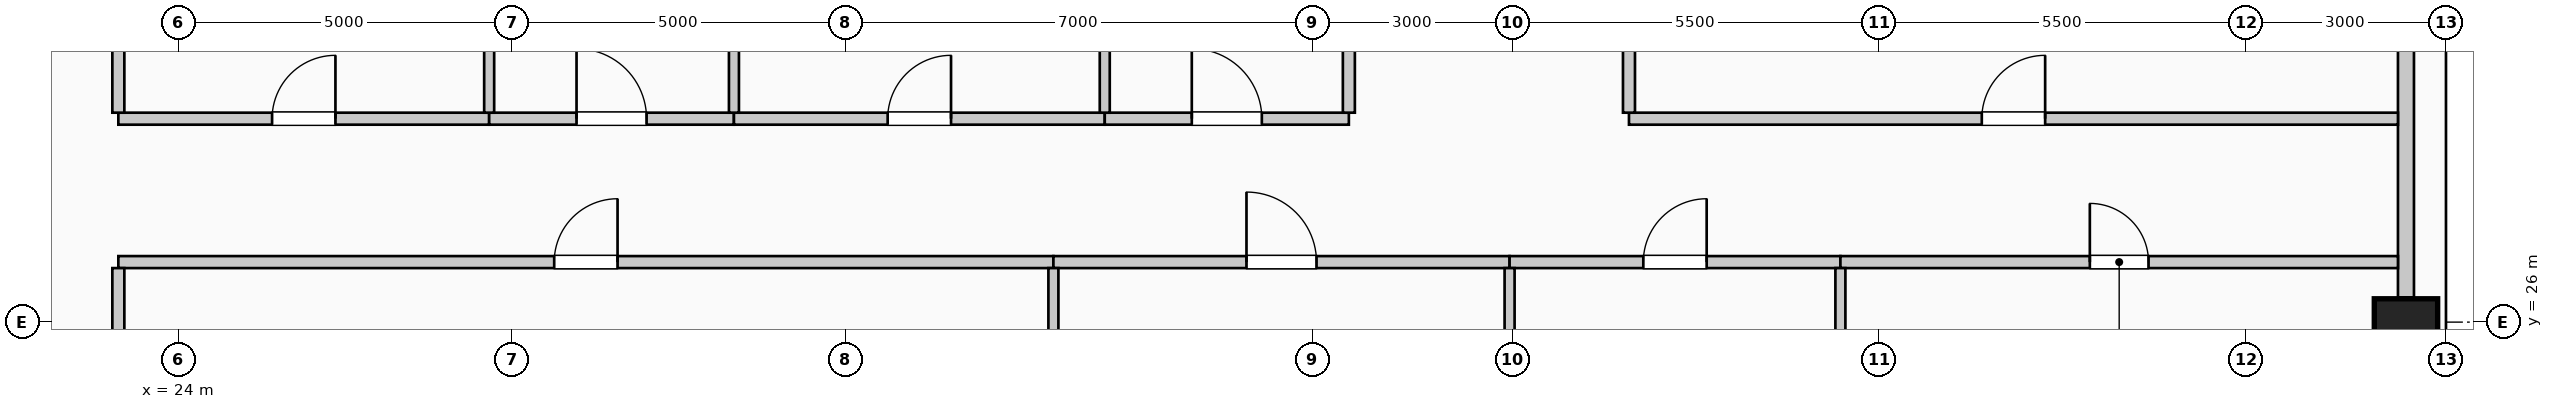
"""IFC4 building model, lengths in metres.
Left out: names, types, materials, properties, quantities, classifications, styles, units other than length and angle.
Written with IfcOpenShell. Run it as: python <this file> out.ifc"""

import sys

from ifc_helpers import new_model, si_unit, direction, frame, frame_2d, origin, origin_2d, place, context, subcontext, project, spatial, rectangle, extrude, element, fill, save


model = new_model("IFC4")
c1 = context("Model", 3, precision=1e-05, world=origin(), true_north=direction((0.0, 1.0)))
c2 = subcontext(c1, "Body", "Model", "MODEL_VIEW")
j1 = project(units=[si_unit("LENGTHUNIT", "METRE"), si_unit("PLANEANGLEUNIT", "RADIAN")], contexts=[c1])
p1 = place(None, origin())
s1 = spatial("IfcSite", under=j1, at=p1, CompositionType="ELEMENT")
p2 = place(p1, origin())
s2 = spatial("IfcBuilding", under=s1, at=p2, CompositionType="ELEMENT")
p3 = place(p2, frame((0.0, 0.0, 272.6)))
s3 = spatial("IfcBuildingStorey", under=s2, at=p3, CompositionType="ELEMENT", Elevation=272.6)
p4 = place(p3, frame((57.4, 26.0, 0.0), z_axis=(0.0, 0.0, 1.0), x_axis=(0.0, 1.0, 0.0)))
e1 = element("IfcColumn", 1, at=p4, inside=s3, PredefinedType="COLUMN", context=c2, shape_type="SweptSolid", body=[
    extrude(rectangle(XDim=0.7, YDim=0.95, at=origin_2d()), origin(), (0.0, 0.0, 1.0), 4.0),
])
p5 = place(p3, frame((57.4, 33.63, 0.0), z_axis=(0.0, 0.0, 1.0), x_axis=(0.0, -1.0, 0.0)))
e2 = element("IfcWall", 2, at=p5, inside=s3, PredefinedType="SOLIDWALL", context=c2, shape_type="SweptSolid", body=[
    extrude(rectangle(XDim=7.26, YDim=0.24, at=frame_2d((3.63, 0.0))), origin(), (0.0, 0.0, 1.0), 3.0),
])
p6 = place(p3, frame((23.1, 26.9, 0.0), z_axis=(0.0, 0.0, 1.0), x_axis=(1.0, 0.0, 0.0)))
e3 = element("IfcWall", 3, at=p6, inside=s3, PredefinedType="PARTITIONING", context=c2, shape_type="SweptSolid", body=[
    extrude(rectangle(XDim=14.02, YDim=0.18, at=frame_2d((7.01, 0.0))), origin(), (0.0, 0.0, 1.0), 3.75),
])
p7 = place(p6, frame((6.535, 0.0, 0.0)))
e4 = element("IfcOpeningElement", 4, at=p7, cuts=e3, PredefinedType="OPENING", context=c2, shape_type="SweptSolid", body=[
    extrude(rectangle(XDim=0.95, YDim=2.15, at=frame_2d((0.475, 1.075))), frame((0.0, 0.1, 0.0), z_axis=(0.0, -1.0, 0.0), x_axis=(1.0, 0.0, 0.0)), (0.0, 0.0, 1.0), 0.2),
])
p8 = place(p3, frame((37.12, 26.9, 0.0), z_axis=(0.0, 0.0, 1.0), x_axis=(1.0, 0.0, 0.0)))
e5 = element("IfcWall", 5, at=p8, inside=s3, PredefinedType="PARTITIONING", context=c2, shape_type="SweptSolid", body=[
    extrude(rectangle(XDim=6.84, YDim=0.18, at=frame_2d((3.42, 0.0))), origin(), (0.0, 0.0, 1.0), 3.75),
])
p9 = place(p8, frame((2.895, 0.0, 0.0)))
e6 = element("IfcOpeningElement", 6, at=p9, cuts=e5, PredefinedType="OPENING", context=c2, shape_type="SweptSolid", body=[
    extrude(rectangle(XDim=1.05, YDim=2.15, at=frame_2d((0.525, 1.075))), frame((0.0, 0.1, 0.0), z_axis=(0.0, -1.0, 0.0), x_axis=(1.0, 0.0, 0.0)), (0.0, 0.0, 1.0), 0.2),
])
p10 = place(p3, frame((43.96, 26.9, 0.0), z_axis=(0.0, 0.0, 1.0), x_axis=(1.0, 0.0, 0.0)))
e7 = element("IfcWall", 7, at=p10, inside=s3, PredefinedType="PARTITIONING", context=c2, shape_type="SweptSolid", body=[
    extrude(rectangle(XDim=4.96, YDim=0.18, at=frame_2d((2.48, 0.0))), origin(), (0.0, 0.0, 1.0), 3.75),
])
p11 = place(p10, frame((2.005, 0.0, 0.0)))
e8 = element("IfcOpeningElement", 8, at=p11, cuts=e7, PredefinedType="OPENING", context=c2, shape_type="SweptSolid", body=[
    extrude(rectangle(XDim=0.95, YDim=2.15, at=frame_2d((0.475, 1.075))), frame((0.0, 0.1, 0.0), z_axis=(0.0, -1.0, 0.0), x_axis=(1.0, 0.0, 0.0)), (0.0, 0.0, 1.0), 0.2),
])
p12 = place(p3, frame((48.92, 26.9, 0.0), z_axis=(0.0, 0.0, 1.0), x_axis=(1.0, 0.0, 0.0)))
e9 = element("IfcWall", 9, at=p12, inside=s3, PredefinedType="PARTITIONING", context=c2, shape_type="SweptSolid", body=[
    extrude(rectangle(XDim=8.36, YDim=0.18, at=frame_2d((4.18, 0.0))), origin(), (0.0, 0.0, 1.0), 3.75),
])
p13 = place(p12, frame((3.74, 0.0, 0.0)))
e10 = element("IfcOpeningElement", 10, at=p13, cuts=e9, PredefinedType="OPENING", context=c2, shape_type="SweptSolid", body=[
    extrude(rectangle(XDim=0.88, YDim=2.1, at=frame_2d((0.44, 1.05))), frame((0.0, 0.1, 0.0), z_axis=(0.0, -1.0, 0.0), x_axis=(1.0, 0.0, 0.0)), (0.0, 0.0, 1.0), 0.2),
])
p14 = place(p3, frame((23.1, 29.05, 0.0), z_axis=(0.0, 0.0, 1.0), x_axis=(1.0, 0.0, 0.0)))
e11 = element("IfcWall", 11, at=p14, inside=s3, PredefinedType="PARTITIONING", context=c2, shape_type="SweptSolid", body=[
    extrude(rectangle(XDim=5.56, YDim=0.18, at=frame_2d((2.78, 0.0))), origin(), (0.0, 0.0, 1.0), 3.75),
])
p15 = place(p14, frame((2.305, 0.0, 0.0)))
e12 = element("IfcOpeningElement", 12, at=p15, cuts=e11, PredefinedType="OPENING", context=c2, shape_type="SweptSolid", body=[
    extrude(rectangle(XDim=0.95, YDim=2.15, at=frame_2d((0.475, 1.075))), frame((0.0, 0.1, 0.0), z_axis=(0.0, -1.0, 0.0), x_axis=(1.0, 0.0, 0.0)), (0.0, 0.0, 1.0), 0.2),
])
p16 = place(p3, frame((28.66, 29.05, 0.0), z_axis=(0.0, 0.0, 1.0), x_axis=(1.0, 0.0, 0.0)))
e13 = element("IfcWall", 13, at=p16, inside=s3, PredefinedType="PARTITIONING", context=c2, shape_type="SweptSolid", body=[
    extrude(rectangle(XDim=3.67, YDim=0.18, at=frame_2d((1.835, 0.0))), origin(), (0.0, 0.0, 1.0), 3.75),
])
p17 = place(p16, frame((1.31, 0.0, 0.0)))
e14 = element("IfcOpeningElement", 14, at=p17, cuts=e13, PredefinedType="OPENING", context=c2, shape_type="SweptSolid", body=[
    extrude(rectangle(XDim=1.05, YDim=2.15, at=frame_2d((0.525, 1.075))), frame((0.0, 0.1, 0.0), z_axis=(0.0, -1.0, 0.0), x_axis=(1.0, 0.0, 0.0)), (0.0, 0.0, 1.0), 0.2),
])
p18 = place(p3, frame((32.33, 29.05, 0.0), z_axis=(0.0, 0.0, 1.0), x_axis=(1.0, 0.0, 0.0)))
e15 = element("IfcWall", 15, at=p18, inside=s3, PredefinedType="PARTITIONING", context=c2, shape_type="SweptSolid", body=[
    extrude(rectangle(XDim=5.56, YDim=0.18, at=frame_2d((2.78, 0.0))), origin(), (0.0, 0.0, 1.0), 3.75),
])
p19 = place(p18, frame((2.305, 0.0, 0.0)))
e16 = element("IfcOpeningElement", 16, at=p19, cuts=e15, PredefinedType="OPENING", context=c2, shape_type="SweptSolid", body=[
    extrude(rectangle(XDim=0.95, YDim=2.15, at=frame_2d((0.475, 1.075))), frame((0.0, 0.1, 0.0), z_axis=(0.0, -1.0, 0.0), x_axis=(1.0, 0.0, 0.0)), (0.0, 0.0, 1.0), 0.2),
])
p20 = place(p3, frame((37.89, 29.05, 0.0), z_axis=(0.0, 0.0, 1.0), x_axis=(1.0, 0.0, 0.0)))
e17 = element("IfcWall", 17, at=p20, inside=s3, PredefinedType="PARTITIONING", context=c2, shape_type="SweptSolid", body=[
    extrude(rectangle(XDim=3.66, YDim=0.18, at=frame_2d((1.83, 0.0))), origin(), (0.0, 0.0, 1.0), 3.75),
])
p21 = place(p20, frame((1.305, 0.0, 0.0)))
e18 = element("IfcOpeningElement", 18, at=p21, cuts=e17, PredefinedType="OPENING", context=c2, shape_type="SweptSolid", body=[
    extrude(rectangle(XDim=1.05, YDim=2.15, at=frame_2d((0.525, 1.075))), frame((0.0, 0.1, 0.0), z_axis=(0.0, -1.0, 0.0), x_axis=(1.0, 0.0, 0.0)), (0.0, 0.0, 1.0), 0.2),
])
p22 = place(p3, frame((45.75, 29.05, 0.0), z_axis=(0.0, 0.0, 1.0), x_axis=(1.0, 0.0, 0.0)))
e19 = element("IfcWall", 19, at=p22, inside=s3, PredefinedType="PARTITIONING", context=c2, shape_type="SweptSolid", body=[
    extrude(rectangle(XDim=11.53, YDim=0.18, at=frame_2d((5.765, 0.0))), origin(), (0.0, 0.0, 1.0), 3.75),
])
p23 = place(p22, frame((5.29, 0.0, 0.0)))
e20 = element("IfcOpeningElement", 20, at=p23, cuts=e19, PredefinedType="OPENING", context=c2, shape_type="SweptSolid", body=[
    extrude(rectangle(XDim=0.95, YDim=2.15, at=frame_2d((0.475, 1.075))), frame((0.0, 0.1, 0.0), z_axis=(0.0, -1.0, 0.0), x_axis=(1.0, 0.0, 0.0)), (0.0, 0.0, 1.0), 0.2),
])
p24 = place(p3, frame((23.1, 17.3, 0.0), z_axis=(0.0, 0.0, 1.0), x_axis=(0.0, 1.0, 0.0)))
e21 = element("IfcWall", 21, at=p24, inside=s3, PredefinedType="PARTITIONING", context=c2, shape_type="SweptSolid", body=[
    extrude(rectangle(XDim=9.51, YDim=0.18, at=frame_2d((4.755, 0.0))), origin(), (0.0, 0.0, 1.0), 3.75),
])
p25 = place(p3, frame((23.1, 29.14, 0.0), z_axis=(0.0, 0.0, 1.0), x_axis=(0.0, 1.0, 0.0)))
e22 = element("IfcWall", 22, at=p25, inside=s3, PredefinedType="PARTITIONING", context=c2, shape_type="SweptSolid", body=[
    extrude(rectangle(XDim=3.12, YDim=0.18, at=frame_2d((1.56, 0.0))), origin(), (0.0, 0.0, 1.0), 3.75),
])
p26 = place(p3, frame((28.66, 29.14, 0.0), z_axis=(0.0, 0.0, 1.0), x_axis=(0.0, 1.0, 0.0)))
e23 = element("IfcWall", 23, at=p26, inside=s3, PredefinedType="PARTITIONING", context=c2, shape_type="SweptSolid", body=[
    extrude(rectangle(XDim=4.435, YDim=0.15, at=frame_2d((2.218, 0.0))), origin(), (0.0, 0.0, 1.0), 3.75),
])
p27 = place(p3, frame((32.33, 29.14, 0.0), z_axis=(0.0, 0.0, 1.0), x_axis=(0.0, 1.0, 0.0)))
e24 = element("IfcWall", 24, at=p27, inside=s3, PredefinedType="PARTITIONING", context=c2, shape_type="SweptSolid", body=[
    extrude(rectangle(XDim=16.14, YDim=0.15, at=frame_2d((8.07, 0.0))), origin(), (0.0, 0.0, 1.0), 3.75),
])
p28 = place(p3, frame((37.12, 0.72, 0.0), z_axis=(0.0, 0.0, 1.0), x_axis=(0.0, 1.0, 0.0)))
e25 = element("IfcWall", 25, at=p28, inside=s3, PredefinedType="PARTITIONING", context=c2, shape_type="SweptSolid", body=[
    extrude(rectangle(XDim=26.09, YDim=0.15, at=frame_2d((13.045, 0.0))), origin(), (0.0, 0.0, 1.0), 3.75),
])
p29 = place(p3, frame((37.89, 29.14, 0.0), z_axis=(0.0, 0.0, 1.0), x_axis=(0.0, 1.0, 0.0)))
e26 = element("IfcWall", 26, at=p29, inside=s3, PredefinedType="PARTITIONING", context=c2, shape_type="SweptSolid", body=[
    extrude(rectangle(XDim=16.14, YDim=0.15, at=frame_2d((8.07, 0.0))), origin(), (0.0, 0.0, 1.0), 3.75),
])
p30 = place(p3, frame((41.55, 29.14, 0.0), z_axis=(0.0, 0.0, 1.0), x_axis=(0.0, 1.0, 0.0)))
e27 = element("IfcWall", 27, at=p30, inside=s3, PredefinedType="PARTITIONING", context=c2, shape_type="SweptSolid", body=[
    extrude(rectangle(XDim=3.21, YDim=0.18, at=frame_2d((1.605, 0.0))), origin(), (0.0, 0.0, 1.0), 3.195),
])
p31 = place(p3, frame((43.96, 1.075, 0.0), z_axis=(0.0, 0.0, 1.0), x_axis=(0.0, 1.0, 0.0)))
e28 = element("IfcWall", 28, at=p31, inside=s3, PredefinedType="PARTITIONING", context=c2, shape_type="SweptSolid", body=[
    extrude(rectangle(XDim=25.735, YDim=0.15, at=frame_2d((12.868, 0.0))), origin(), (0.0, 0.0, 1.0), 3.75),
])
p32 = place(p3, frame((45.75, 29.14, 0.0), z_axis=(0.0, 0.0, 1.0), x_axis=(0.0, 1.0, 0.0)))
e29 = element("IfcWall", 29, at=p32, inside=s3, PredefinedType="PARTITIONING", context=c2, shape_type="SweptSolid", body=[
    extrude(rectangle(XDim=3.135, YDim=0.18, at=frame_2d((1.567, 0.0))), origin(), (0.0, 0.0, 1.0), 3.75),
])
p33 = place(p3, frame((48.92, 0.72, 0.0), z_axis=(0.0, 0.0, 1.0), x_axis=(0.0, 1.0, 0.0)))
e30 = element("IfcWall", 30, at=p33, inside=s3, PredefinedType="PARTITIONING", context=c2, shape_type="SweptSolid", body=[
    extrude(rectangle(XDim=26.09, YDim=0.15, at=frame_2d((13.045, 0.0))), origin(), (0.0, 0.0, 1.0), 3.75),
])
p34 = place(p7, origin())
e31 = element("IfcDoor", 31, at=p34, inside=s3, OperationType="SINGLE_SWING_RIGHT", PredefinedType="DOOR", context=c2, shape_type="SweptSolid", body=[
    extrude(rectangle(XDim=0.95, YDim=2.15, at=frame_2d((0.475, 1.075))), frame((0.0, 0.025, 0.0), z_axis=(0.0, -1.0, 0.0), x_axis=(1.0, 0.0, 0.0)), (0.0, 0.0, 1.0), 0.05),
])
fill(e4, e31)
p35 = place(p9, origin())
e32 = element("IfcDoor", 32, at=p35, inside=s3, OperationType="SINGLE_SWING_LEFT", PredefinedType="DOOR", context=c2, shape_type="SweptSolid", body=[
    extrude(rectangle(XDim=1.05, YDim=2.15, at=frame_2d((0.525, 1.075))), frame((0.0, 0.025, 0.0), z_axis=(0.0, -1.0, 0.0), x_axis=(1.0, 0.0, 0.0)), (0.0, 0.0, 1.0), 0.05),
])
fill(e6, e32)
p36 = place(p11, origin())
e33 = element("IfcDoor", 33, at=p36, inside=s3, OperationType="SINGLE_SWING_RIGHT", PredefinedType="DOOR", context=c2, shape_type="SweptSolid", body=[
    extrude(rectangle(XDim=0.95, YDim=2.15, at=frame_2d((0.475, 1.075))), frame((0.0, 0.025, 0.0), z_axis=(0.0, -1.0, 0.0), x_axis=(1.0, 0.0, 0.0)), (0.0, 0.0, 1.0), 0.05),
])
fill(e8, e33)
p37 = place(p13, origin())
e34 = element("IfcDoor", 34, at=p37, inside=s3, OperationType="SINGLE_SWING_LEFT", PredefinedType="DOOR", context=c2, shape_type="SweptSolid", body=[
    extrude(rectangle(XDim=0.88, YDim=2.1, at=frame_2d((0.44, 1.05))), frame((0.0, 0.025, 0.0), z_axis=(0.0, -1.0, 0.0), x_axis=(1.0, 0.0, 0.0)), (0.0, 0.0, 1.0), 0.05),
])
fill(e10, e34)
p38 = place(p15, origin())
e35 = element("IfcDoor", 35, at=p38, inside=s3, OperationType="SINGLE_SWING_RIGHT", PredefinedType="DOOR", context=c2, shape_type="SweptSolid", body=[
    extrude(rectangle(XDim=0.95, YDim=2.15, at=frame_2d((0.475, 1.075))), frame((0.0, 0.025, 0.0), z_axis=(0.0, -1.0, 0.0), x_axis=(1.0, 0.0, 0.0)), (0.0, 0.0, 1.0), 0.05),
])
fill(e12, e35)
p39 = place(p17, origin())
e36 = element("IfcDoor", 36, at=p39, inside=s3, OperationType="SINGLE_SWING_LEFT", PredefinedType="DOOR", context=c2, shape_type="SweptSolid", body=[
    extrude(rectangle(XDim=1.05, YDim=2.15, at=frame_2d((0.525, 1.075))), frame((0.0, 0.025, 0.0), z_axis=(0.0, -1.0, 0.0), x_axis=(1.0, 0.0, 0.0)), (0.0, 0.0, 1.0), 0.05),
])
fill(e14, e36)
p40 = place(p19, origin())
e37 = element("IfcDoor", 37, at=p40, inside=s3, OperationType="SINGLE_SWING_RIGHT", PredefinedType="DOOR", context=c2, shape_type="SweptSolid", body=[
    extrude(rectangle(XDim=0.95, YDim=2.15, at=frame_2d((0.475, 1.075))), frame((0.0, 0.025, 0.0), z_axis=(0.0, -1.0, 0.0), x_axis=(1.0, 0.0, 0.0)), (0.0, 0.0, 1.0), 0.05),
])
fill(e16, e37)
p41 = place(p21, origin())
e38 = element("IfcDoor", 38, at=p41, inside=s3, OperationType="SINGLE_SWING_LEFT", PredefinedType="DOOR", context=c2, shape_type="SweptSolid", body=[
    extrude(rectangle(XDim=1.05, YDim=2.15, at=frame_2d((0.525, 1.075))), frame((0.0, 0.025, 0.0), z_axis=(0.0, -1.0, 0.0), x_axis=(1.0, 0.0, 0.0)), (0.0, 0.0, 1.0), 0.05),
])
fill(e18, e38)
p42 = place(p23, origin())
e39 = element("IfcDoor", 39, at=p42, inside=s3, OperationType="SINGLE_SWING_RIGHT", PredefinedType="DOOR", context=c2, shape_type="SweptSolid", body=[
    extrude(rectangle(XDim=0.95, YDim=2.15, at=frame_2d((0.475, 1.075))), frame((0.0, 0.025, 0.0), z_axis=(0.0, -1.0, 0.0), x_axis=(1.0, 0.0, 0.0)), (0.0, 0.0, 1.0), 0.05),
])
fill(e20, e39)
save(model, sys.argv[1])
